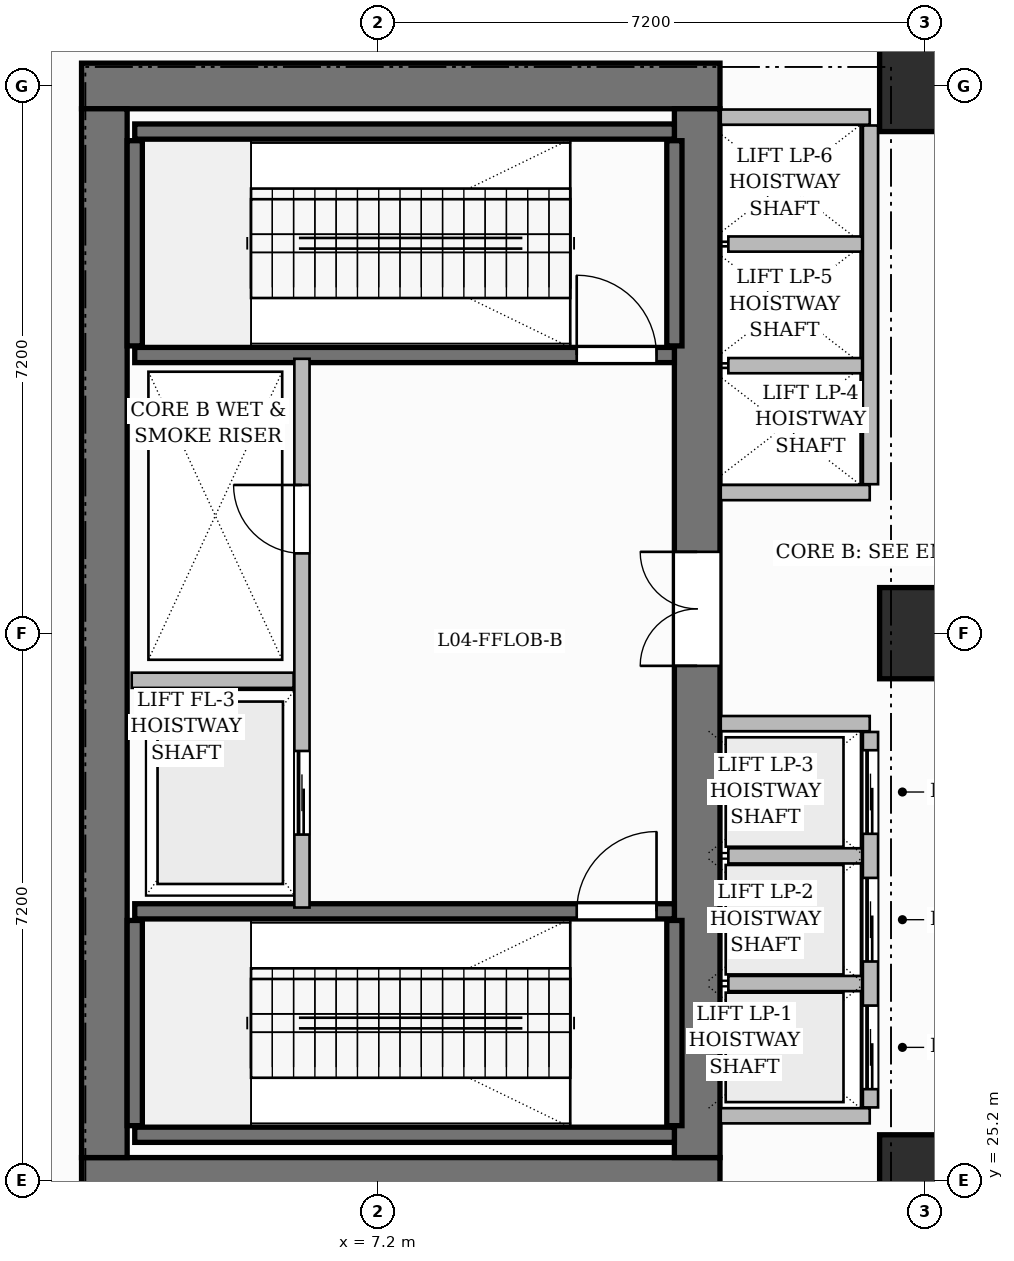
"""IFC4 building model, lengths in metres.
Left out: names, types, materials, properties, quantities, classifications, styles, units other than length and angle.
Written with IfcOpenShell. Run it as: python <this file> out.ifc"""

import sys

from ifc_helpers import new_model, si_unit, direction, frame, frame_2d, origin, origin_2d, place, context, subcontext, project, spatial, rectangle, extrude, source, transform, mapped, element, fill, save


model = new_model("IFC4")
c1 = context("Model", 3, precision=1e-05, world=origin(), true_north=direction((0.0, 1.0)))
c2 = subcontext(c1, "Body", "Model", "MODEL_VIEW")
j1 = project(units=[si_unit("LENGTHUNIT", "METRE"), si_unit("PLANEANGLEUNIT", "RADIAN")], contexts=[c1])
p1 = place(None, origin())
s1 = spatial("IfcSite", under=j1, at=p1, CompositionType="ELEMENT")
p2 = place(p1, origin())
s2 = spatial("IfcBuilding", under=s1, at=p2, CompositionType="ELEMENT")
p3 = place(p2, frame((0.0, 0.0, 21.6)))
s3 = spatial("IfcBuildingStorey", under=s2, at=p3, CompositionType="ELEMENT", Elevation=21.6)
for number, where, z_axis, x_axis in (
    (1, (3.3, 25.2, 0.0), (0.0, 0.0, 1.0), (1.0, 0.0, 0.0)),
    (2, (3.3, 39.6, 0.0), (0.0, 0.0, 1.0), (1.0, 0.0, 0.0)),
):
    element("IfcWall", number, at=place(p3, frame(where, z_axis=z_axis, x_axis=x_axis)), inside=s3, PredefinedType="SHEAR", context=c2, shape_type="SweptSolid", body=[
        extrude(rectangle(XDim=8.4, YDim=0.6, at=frame_2d((4.2, 0.0))), origin(), (0.0, 0.0, 1.0), 5.4),
    ])
p4 = place(p3, frame((3.6, 25.5, 0.0), z_axis=(0.0, 0.0, 1.0), x_axis=(0.0, 1.0, 0.0)))
e3 = element("IfcWall", 3, at=p4, inside=s3, PredefinedType="SHEAR", context=c2, shape_type="SweptSolid", body=[
    extrude(rectangle(XDim=13.8, YDim=0.6, at=frame_2d((6.9, 0.0))), origin(), (0.0, 0.0, 1.0), 5.4),
])
p5 = place(p3, frame((11.4, 25.5, 0.0), z_axis=(0.0, 0.0, 1.0), x_axis=(0.0, 1.0, 0.0)))
e4 = element("IfcWall", 4, at=p5, inside=s3, PredefinedType="SHEAR", context=c2, shape_type="SweptSolid", body=[
    extrude(rectangle(XDim=13.8, YDim=0.6, at=frame_2d((6.9, 0.0))), origin(), (0.0, 0.0, 1.0), 5.4),
])
p6 = place(p5, frame((6.47, 0.0, 0.0)))
e5 = element("IfcOpeningElement", 5, at=p6, cuts=e4, PredefinedType="OPENING", context=c2, shape_type="SweptSolid", body=[
    extrude(rectangle(XDim=1.5, YDim=2.2, at=frame_2d((0.75, 1.1))), frame((0.0, 0.31, 0.0), z_axis=(0.0, -1.0, 0.0), x_axis=(1.0, 0.0, 0.0)), (0.0, 0.0, 1.0), 0.62),
])
m1 = source(origin(), c2, "Body", "SweptSolid", [
    extrude(rectangle(XDim=1.2, YDim=1.2, at=origin_2d()), origin(), (0.0, 0.0, 1.0), 5.4),
])
for number, where, z_axis, x_axis in (
    (6, (14.4, 25.2, 0.0), (0.0, 0.0, 1.0), (1.0, 0.0, 0.0)),
    (7, (14.4, 32.4, 0.0), (0.0, 0.0, 1.0), (1.0, 0.0, 0.0)),
    (8, (14.4, 39.6, 0.0), (0.0, 0.0, 1.0), (1.0, 0.0, 0.0)),
):
    element("IfcColumn", number, at=place(p3, frame(where, z_axis=z_axis, x_axis=x_axis)), inside=s3, PredefinedType="COLUMN", context=c2, shape_type="MappedRepresentation", body=[
        mapped(m1, transform((0.0, 0.0, 0.0), scale=1.0)),
    ])
p7 = place(p3, frame((4.0, 25.8, 0.0), z_axis=(0.0, 0.0, 1.0), x_axis=(1.0, 0.0, 0.0)))
e9 = element("IfcWall", 9, at=p7, inside=s3, PredefinedType="SHEAR", context=c2, shape_type="SweptSolid", body=[
    extrude(rectangle(XDim=7.1, YDim=0.2, at=frame_2d((3.55, 0.0))), origin(), (0.0, 0.0, 1.0), 5.4),
])
for number, where, z_axis, x_axis in (
    (10, (4.0, 25.92, 0.0), (0.0, 0.0, 1.0), (0.0, 1.0, 0.0)),
    (11, (11.1, 25.92, 0.0), (0.0, 0.0, 1.0), (0.0, 1.0, 0.0)),
):
    element("IfcWall", number, at=place(p3, frame(where, z_axis=z_axis, x_axis=x_axis)), inside=s3, PredefinedType="SHEAR", context=c2, shape_type="SweptSolid", body=[
        extrude(rectangle(XDim=2.7, YDim=0.2, at=frame_2d((1.35, 0.0))), origin(), (0.0, 0.0, 1.0), 5.4),
    ])
p8 = place(p3, frame((4.0, 28.74, 0.0), z_axis=(0.0, 0.0, 1.0), x_axis=(1.0, 0.0, 0.0)))
e12 = element("IfcWall", 12, at=p8, inside=s3, PredefinedType="SHEAR", context=c2, shape_type="SweptSolid", body=[
    extrude(rectangle(XDim=7.1, YDim=0.2, at=frame_2d((3.55, 0.0))), origin(), (0.0, 0.0, 1.0), 5.4),
])
p9 = place(p8, frame((5.815, 0.0, 0.0)))
e13 = element("IfcOpeningElement", 13, at=p9, cuts=e12, PredefinedType="OPENING", context=c2, shape_type="SweptSolid", body=[
    extrude(rectangle(XDim=1.05, YDim=2.2, at=frame_2d((0.525, 1.1))), frame((0.0, 0.11, 0.0), z_axis=(0.0, -1.0, 0.0), x_axis=(1.0, 0.0, 0.0)), (0.0, 0.0, 1.0), 0.22),
])
p10 = place(p3, frame((4.0, 39.0, 0.0), z_axis=(0.0, 0.0, 1.0), x_axis=(1.0, 0.0, 0.0)))
e14 = element("IfcWall", 14, at=p10, inside=s3, PredefinedType="SHEAR", context=c2, shape_type="SweptSolid", body=[
    extrude(rectangle(XDim=7.1, YDim=0.2, at=frame_2d((3.55, 0.0))), origin(), (0.0, 0.0, 1.0), 5.4),
])
for number, where, z_axis, x_axis in (
    (15, (4.0, 36.18, 0.0), (0.0, 0.0, 1.0), (0.0, 1.0, 0.0)),
    (16, (11.1, 36.18, 0.0), (0.0, 0.0, 1.0), (0.0, 1.0, 0.0)),
):
    element("IfcWall", number, at=place(p3, frame(where, z_axis=z_axis, x_axis=x_axis)), inside=s3, PredefinedType="SHEAR", context=c2, shape_type="SweptSolid", body=[
        extrude(rectangle(XDim=2.7, YDim=0.2, at=frame_2d((1.35, 0.0))), origin(), (0.0, 0.0, 1.0), 5.4),
    ])
p11 = place(p3, frame((4.0, 36.06, 0.0), z_axis=(0.0, 0.0, 1.0), x_axis=(1.0, 0.0, 0.0)))
e17 = element("IfcWall", 17, at=p11, inside=s3, PredefinedType="SHEAR", context=c2, shape_type="SweptSolid", body=[
    extrude(rectangle(XDim=7.1, YDim=0.2, at=frame_2d((3.55, 0.0))), origin(), (0.0, 0.0, 1.0), 5.4),
])
p12 = place(p11, frame((5.815, 0.0, 0.0)))
e18 = element("IfcOpeningElement", 18, at=p12, cuts=e17, PredefinedType="OPENING", context=c2, shape_type="SweptSolid", body=[
    extrude(rectangle(XDim=1.05, YDim=2.2, at=frame_2d((0.525, 1.1))), frame((0.0, 0.11, 0.0), z_axis=(0.0, -1.0, 0.0), x_axis=(1.0, 0.0, 0.0)), (0.0, 0.0, 1.0), 0.22),
])
p13 = place(p3, frame((6.2, 28.79, 0.0), z_axis=(0.0, 0.0, 1.0), x_axis=(0.0, 1.0, 0.0)))
e19 = element("IfcWall", 19, at=p13, inside=s3, PredefinedType="PARTITIONING", context=c2, shape_type="SweptSolid", body=[
    extrude(rectangle(XDim=7.22, YDim=0.2, at=frame_2d((3.61, 0.0))), origin(), (0.0, 0.0, 1.0), 5.1),
])
p14 = place(p13, frame((4.66, 0.0, 0.0)))
e20 = element("IfcOpeningElement", 20, at=p14, cuts=e19, PredefinedType="OPENING", context=c2, shape_type="SweptSolid", body=[
    extrude(rectangle(XDim=0.9, YDim=2.1, at=frame_2d((0.45, 1.05))), frame((0.0, 0.11, 0.0), z_axis=(0.0, -1.0, 0.0), x_axis=(1.0, 0.0, 0.0)), (0.0, 0.0, 1.0), 0.22),
])
p15 = place(p13, frame((0.96, 0.0, 0.0)))
e21 = element("IfcOpeningElement", 21, at=p15, cuts=e19, PredefinedType="OPENING", context=c2, shape_type="SweptSolid", body=[
    extrude(rectangle(XDim=1.1, YDim=2.2, at=frame_2d((0.55, 1.1))), frame((0.0, 0.11, 0.0), z_axis=(0.0, -1.0, 0.0), x_axis=(1.0, 0.0, 0.0)), (0.0, 0.0, 1.0), 0.22),
])
p16 = place(p3, frame((3.96, 31.78, 0.0), z_axis=(0.0, 0.0, 1.0), x_axis=(1.0, 0.0, 0.0)))
e22 = element("IfcWall", 22, at=p16, inside=s3, PredefinedType="PARTITIONING", context=c2, shape_type="SweptSolid", body=[
    extrude(rectangle(XDim=2.13, YDim=0.2, at=frame_2d((1.065, 0.0))), origin(), (0.0, 0.0, 1.0), 5.1),
])
for number, where, z_axis, x_axis in (
    (23, (11.71, 26.05, 0.0), (0.0, 0.0, 1.0), (1.0, 0.0, 0.0)),
    (24, (11.71, 31.21, 0.0), (0.0, 0.0, 1.0), (1.0, 0.0, 0.0)),
):
    element("IfcWall", number, at=place(p3, frame(where, z_axis=z_axis, x_axis=x_axis)), inside=s3, PredefinedType="PARTITIONING", context=c2, shape_type="SweptSolid", body=[
        extrude(rectangle(XDim=1.96, YDim=0.2, at=frame_2d((0.98, 0.0))), origin(), (0.0, 0.0, 1.0), 5.1),
    ])
p17 = place(p3, frame((13.68, 26.16, 0.0), z_axis=(0.0, 0.0, 1.0), x_axis=(0.0, 1.0, 0.0)))
e25 = element("IfcWall", 25, at=p17, inside=s3, PredefinedType="PARTITIONING", context=c2, shape_type="SweptSolid", body=[
    extrude(rectangle(XDim=4.94, YDim=0.2, at=frame_2d((2.47, 0.0))), origin(), (0.0, 0.0, 1.0), 5.1),
])
p18 = place(p17, frame((0.24, 0.0, 0.0)))
e26 = element("IfcOpeningElement", 26, at=p18, cuts=e25, PredefinedType="OPENING", context=c2, shape_type="SweptSolid", body=[
    extrude(rectangle(XDim=1.1, YDim=2.2, at=frame_2d((0.55, 1.1))), frame((0.0, 0.11, 0.0), z_axis=(0.0, -1.0, 0.0), x_axis=(1.0, 0.0, 0.0)), (0.0, 0.0, 1.0), 0.22),
])
p19 = place(p17, frame((1.92, 0.0, 0.0)))
e27 = element("IfcOpeningElement", 27, at=p19, cuts=e25, PredefinedType="OPENING", context=c2, shape_type="SweptSolid", body=[
    extrude(rectangle(XDim=1.1, YDim=2.2, at=frame_2d((0.55, 1.1))), frame((0.0, 0.11, 0.0), z_axis=(0.0, -1.0, 0.0), x_axis=(1.0, 0.0, 0.0)), (0.0, 0.0, 1.0), 0.22),
])
p20 = place(p17, frame((3.6, 0.0, 0.0)))
e28 = element("IfcOpeningElement", 28, at=p20, cuts=e25, PredefinedType="OPENING", context=c2, shape_type="SweptSolid", body=[
    extrude(rectangle(XDim=1.1, YDim=2.2, at=frame_2d((0.55, 1.1))), frame((0.0, 0.11, 0.0), z_axis=(0.0, -1.0, 0.0), x_axis=(1.0, 0.0, 0.0)), (0.0, 0.0, 1.0), 0.22),
])
for number, where, z_axis, x_axis in (
    (29, (11.81, 27.79, 0.0), (0.0, 0.0, 1.0), (1.0, 0.0, 0.0)),
    (30, (11.81, 29.47, 0.0), (0.0, 0.0, 1.0), (1.0, 0.0, 0.0)),
):
    element("IfcWall", number, at=place(p3, frame(where, z_axis=z_axis, x_axis=x_axis)), inside=s3, PredefinedType="PARTITIONING", context=c2, shape_type="SweptSolid", body=[
        extrude(rectangle(XDim=1.76, YDim=0.2, at=frame_2d((0.88, 0.0))), origin(), (0.0, 0.0, 1.0), 5.1),
    ])
for number, where, z_axis, x_axis in (
    (31, (11.71, 34.25, 0.0), (0.0, 0.0, 1.0), (1.0, 0.0, 0.0)),
    (32, (11.71, 39.19, 0.0), (0.0, 0.0, 1.0), (1.0, 0.0, 0.0)),
):
    element("IfcWall", number, at=place(p3, frame(where, z_axis=z_axis, x_axis=x_axis)), inside=s3, PredefinedType="PARTITIONING", context=c2, shape_type="SweptSolid", body=[
        extrude(rectangle(XDim=1.96, YDim=0.2, at=frame_2d((0.98, 0.0))), origin(), (0.0, 0.0, 1.0), 5.1),
    ])
p21 = place(p3, frame((13.68, 34.36, 0.0), z_axis=(0.0, 0.0, 1.0), x_axis=(0.0, 1.0, 0.0)))
e33 = element("IfcWall", 33, at=p21, inside=s3, PredefinedType="PARTITIONING", context=c2, shape_type="SweptSolid", body=[
    extrude(rectangle(XDim=4.72, YDim=0.2, at=frame_2d((2.36, 0.0))), origin(), (0.0, 0.0, 1.0), 5.1),
])
for number, where, z_axis, x_axis in (
    (34, (11.81, 35.92, 0.0), (0.0, 0.0, 1.0), (1.0, 0.0, 0.0)),
    (35, (11.81, 37.52, 0.0), (0.0, 0.0, 1.0), (1.0, 0.0, 0.0)),
):
    element("IfcWall", number, at=place(p3, frame(where, z_axis=z_axis, x_axis=x_axis)), inside=s3, PredefinedType="PARTITIONING", context=c2, shape_type="SweptSolid", body=[
        extrude(rectangle(XDim=1.76, YDim=0.2, at=frame_2d((0.88, 0.0))), origin(), (0.0, 0.0, 1.0), 5.1),
    ])
m2 = source(origin(), c2, "Body", "SweptSolid", [
    extrude(rectangle(XDim=1.05, YDim=2.2, at=frame_2d((0.525, 1.1))), frame((0.0, 0.025, 0.0), z_axis=(0.0, -1.0, 0.0), x_axis=(1.0, 0.0, 0.0)), (0.0, 0.0, 1.0), 0.05),
])
p22 = place(p9, origin())
e36 = element("IfcDoor", 36, at=p22, inside=s3, OperationType="SINGLE_SWING_RIGHT", PredefinedType="DOOR", context=c2, shape_type="MappedRepresentation", body=[
    mapped(m2, transform((0.0, 0.0, 0.0), scale=1.0)),
])
fill(e13, e36)
p23 = place(p12, origin())
e37 = element("IfcDoor", 37, at=p23, inside=s3, OperationType="SINGLE_SWING_LEFT", PredefinedType="DOOR", context=c2, shape_type="MappedRepresentation", body=[
    mapped(m2, transform((0.0, 0.0, 0.0), scale=1.0)),
])
fill(e18, e37)
m3 = source(origin(), c2, "Body", "SweptSolid", [
    extrude(rectangle(XDim=0.9, YDim=2.1, at=frame_2d((0.45, 1.05))), frame((0.0, 0.025, 0.0), z_axis=(0.0, -1.0, 0.0), x_axis=(1.0, 0.0, 0.0)), (0.0, 0.0, 1.0), 0.05),
])
p24 = place(p14, origin())
e38 = element("IfcDoor", 38, at=p24, inside=s3, OperationType="SINGLE_SWING_RIGHT", PredefinedType="DOOR", context=c2, shape_type="MappedRepresentation", body=[
    mapped(m3, transform((0.0, 0.0, 0.0), scale=1.0)),
])
fill(e20, e38)
m4 = source(origin(), c2, "Body", "SweptSolid", [
    extrude(rectangle(XDim=1.5, YDim=2.2, at=frame_2d((0.75, 1.1))), frame((0.0, 0.025, 0.0), z_axis=(0.0, -1.0, 0.0), x_axis=(1.0, 0.0, 0.0)), (0.0, 0.0, 1.0), 0.05),
])
p25 = place(p6, origin())
e39 = element("IfcDoor", 39, at=p25, inside=s3, OperationType="DOUBLE_DOOR_SINGLE_SWING", PredefinedType="DOOR", context=c2, shape_type="MappedRepresentation", body=[
    mapped(m4, transform((0.0, 0.0, 0.0), scale=1.0)),
])
fill(e5, e39)
m5 = source(origin(), c2, "Body", "SweptSolid", [
    extrude(rectangle(XDim=1.1, YDim=2.2, at=frame_2d((0.55, 1.1))), frame((0.0, 0.025, 0.0), z_axis=(0.0, -1.0, 0.0), x_axis=(1.0, 0.0, 0.0)), (0.0, 0.0, 1.0), 0.05),
])
p26 = place(p15, origin())
e40 = element("IfcDoor", 40, at=p26, inside=s3, OperationType="SLIDING_TO_LEFT", PredefinedType="DOOR", context=c2, shape_type="MappedRepresentation", body=[
    mapped(m5, transform((0.0, 0.0, 0.0), scale=1.0)),
])
fill(e21, e40)
p27 = place(p18, origin())
e41 = element("IfcDoor", 41, at=p27, inside=s3, OperationType="SLIDING_TO_LEFT", PredefinedType="DOOR", context=c2, shape_type="MappedRepresentation", body=[
    mapped(m5, transform((0.0, 0.0, 0.0), scale=1.0)),
])
fill(e26, e41)
p28 = place(p19, origin())
e42 = element("IfcDoor", 42, at=p28, inside=s3, OperationType="SLIDING_TO_LEFT", PredefinedType="DOOR", context=c2, shape_type="MappedRepresentation", body=[
    mapped(m5, transform((0.0, 0.0, 0.0), scale=1.0)),
])
fill(e27, e42)
p29 = place(p20, origin())
e43 = element("IfcDoor", 43, at=p29, inside=s3, OperationType="SLIDING_TO_LEFT", PredefinedType="DOOR", context=c2, shape_type="MappedRepresentation", body=[
    mapped(m5, transform((0.0, 0.0, 0.0), scale=1.0)),
])
fill(e28, e43)
save(model, sys.argv[1])
